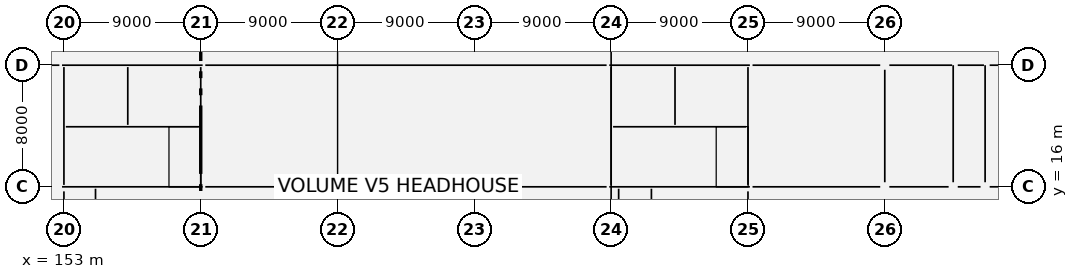
"""IFC4 building model, lengths in metres.
Left out: names, types, materials, properties, quantities, classifications, styles, units other than length and angle.
Written with IfcOpenShell. Run it as: python <this file> out.ifc"""

import sys

from ifc_helpers import new_model, si_unit, direction, frame, frame_2d, origin, origin_2d, place, context, subcontext, project, spatial, rectangle, extrude, element, fill, save


model = new_model("IFC4")
c1 = context("Model", 3, precision=1e-05, world=origin(), true_north=direction((0.0, 1.0)))
c2 = subcontext(c1, "Body", "Model", "MODEL_VIEW")
j1 = project(units=[si_unit("LENGTHUNIT", "METRE"), si_unit("PLANEANGLEUNIT", "RADIAN")], contexts=[c1])
p1 = place(None, origin())
s1 = spatial("IfcSite", under=j1, at=p1, CompositionType="ELEMENT")
p2 = place(p1, origin())
s2 = spatial("IfcBuilding", under=s1, at=p2, CompositionType="ELEMENT")
p3 = place(p2, origin())
s3 = spatial("IfcBuildingStorey", under=s2, at=p3, CompositionType="ELEMENT", Elevation=0.0)
for number, where, z_axis, x_axis in (
    (1, (153.0, 16.0, -0.5), (0.0, 0.0, 1.0), (1.0, 0.0, 0.0)),
    (2, (153.0, 24.0, -0.5), (0.0, 0.0, 1.0), (1.0, 0.0, 0.0)),
    (3, (162.0, 16.0, -0.5), (0.0, 0.0, 1.0), (1.0, 0.0, 0.0)),
    (4, (162.0, 24.0, -0.5), (0.0, 0.0, 1.0), (1.0, 0.0, 0.0)),
    (5, (171.0, 16.0, -0.5), (0.0, 0.0, 1.0), (1.0, 0.0, 0.0)),
    (6, (171.0, 24.0, -0.5), (0.0, 0.0, 1.0), (1.0, 0.0, 0.0)),
    (7, (180.0, 16.0, -0.5), (0.0, 0.0, 1.0), (1.0, 0.0, 0.0)),
    (8, (180.0, 24.0, -0.5), (0.0, 0.0, 1.0), (1.0, 0.0, 0.0)),
    (9, (189.0, 16.0, -0.5), (0.0, 0.0, 1.0), (1.0, 0.0, 0.0)),
    (10, (189.0, 24.0, -0.5), (0.0, 0.0, 1.0), (1.0, 0.0, 0.0)),
    (11, (198.0, 16.0, -0.5), (0.0, 0.0, 1.0), (1.0, 0.0, 0.0)),
    (12, (198.0, 24.0, -0.5), (0.0, 0.0, 1.0), (1.0, 0.0, 0.0)),
    (13, (207.0, 16.0, -0.5), (0.0, 0.0, 1.0), (1.0, 0.0, 0.0)),
    (14, (207.0, 24.0, -0.5), (0.0, 0.0, 1.0), (1.0, 0.0, 0.0)),
):
    element("IfcColumn", number, at=place(p3, frame(where, z_axis=z_axis, x_axis=x_axis)), inside=s3, PredefinedType="COLUMN", context=c2, shape_type="SweptSolid", body=[
        extrude(rectangle(XDim=0.7, YDim=0.7, at=origin_2d()), origin(), (0.0, 0.0, 1.0), 6.8),
    ])
p4 = place(p3, frame((162.125, 16.0, -0.5), z_axis=(0.0, 0.0, 1.0), x_axis=(-1.0, 0.0, 0.0)))
e15 = element("IfcWall", 15, at=p4, inside=s3, PredefinedType="SOLIDWALL", context=c2, shape_type="SweptSolid", body=[
    extrude(rectangle(XDim=9.25, YDim=0.25, at=frame_2d((4.625, 0.0))), origin(), (0.0, 0.0, 1.0), 6.8),
])
p5 = place(p4, frame((7.425, 0.0, 0.5)))
e16 = element("IfcOpeningElement", 16, at=p5, cuts=e15, PredefinedType="OPENING", context=c2, shape_type="SweptSolid", body=[
    extrude(rectangle(XDim=1.2, YDim=2.2, at=frame_2d((0.6, 1.1))), frame((0.0, 0.135, 0.0), z_axis=(0.0, -1.0, 0.0), x_axis=(1.0, 0.0, 0.0)), (0.0, 0.0, 1.0), 0.27),
])
p6 = place(p3, frame((152.875, 24.0, -0.5), z_axis=(0.0, 0.0, 1.0), x_axis=(1.0, 0.0, 0.0)))
e17 = element("IfcWall", 17, at=p6, inside=s3, PredefinedType="SOLIDWALL", context=c2, shape_type="SweptSolid", body=[
    extrude(rectangle(XDim=9.25, YDim=0.25, at=frame_2d((4.625, 0.0))), origin(), (0.0, 0.0, 1.0), 6.8),
])
p7 = place(p6, frame((5.775, 0.0, 0.5)))
e18 = element("IfcOpeningElement", 18, at=p7, cuts=e17, PredefinedType="OPENING", context=c2, shape_type="SweptSolid", body=[
    extrude(rectangle(XDim=1.6, YDim=2.2, at=frame_2d((0.8, 1.1))), frame((0.0, 0.135, 0.0), z_axis=(0.0, -1.0, 0.0), x_axis=(1.0, 0.0, 0.0)), (0.0, 0.0, 1.0), 0.27),
])
p8 = place(p3, frame((153.0, 16.125, -0.5), z_axis=(0.0, 0.0, 1.0), x_axis=(0.0, 1.0, 0.0)))
e19 = element("IfcWall", 19, at=p8, inside=s3, PredefinedType="SOLIDWALL", context=c2, shape_type="SweptSolid", body=[
    extrude(rectangle(XDim=7.75, YDim=0.25, at=frame_2d((3.875, 0.0))), origin(), (0.0, 0.0, 1.0), 6.8),
])
p9 = place(p8, frame((1.15, 0.0, 0.5)))
e20 = element("IfcOpeningElement", 20, at=p9, cuts=e19, PredefinedType="OPENING", context=c2, shape_type="SweptSolid", body=[
    extrude(rectangle(XDim=1.2, YDim=2.2, at=frame_2d((0.6, 1.1))), frame((0.0, 0.135, 0.0), z_axis=(0.0, -1.0, 0.0), x_axis=(1.0, 0.0, 0.0)), (0.0, 0.0, 1.0), 0.27),
])
p10 = place(p3, frame((162.0, 16.125, -0.5), z_axis=(0.0, 0.0, 1.0), x_axis=(0.0, 1.0, 0.0)))
e21 = element("IfcWall", 21, at=p10, inside=s3, PredefinedType="SOLIDWALL", context=c2, shape_type="SweptSolid", body=[
    extrude(rectangle(XDim=7.75, YDim=0.25, at=frame_2d((3.875, 0.0))), origin(), (0.0, 0.0, 1.0), 6.8),
])
p11 = place(p3, frame((153.125, 19.95, -0.5), z_axis=(0.0, 0.0, 1.0), x_axis=(1.0, 0.0, 0.0)))
e22 = element("IfcWall", 22, at=p11, inside=s3, PredefinedType="SOLIDWALL", context=c2, shape_type="SweptSolid", body=[
    extrude(rectangle(XDim=8.75, YDim=0.25, at=frame_2d((4.375, 0.0))), origin(), (0.0, 0.0, 1.0), 6.8),
])
p12 = place(p3, frame((157.2, 20.075, -0.5), z_axis=(0.0, 0.0, 1.0), x_axis=(0.0, 1.0, 0.0)))
e23 = element("IfcWall", 23, at=p12, inside=s3, PredefinedType="SOLIDWALL", context=c2, shape_type="SweptSolid", body=[
    extrude(rectangle(XDim=3.8, YDim=0.25, at=frame_2d((1.9, 0.0))), origin(), (0.0, 0.0, 1.0), 6.8),
])
p13 = place(p12, frame((1.35, 0.0, 0.5)))
e24 = element("IfcOpeningElement", 24, at=p13, cuts=e23, PredefinedType="OPENING", context=c2, shape_type="SweptSolid", body=[
    extrude(rectangle(XDim=1.1, YDim=2.2, at=frame_2d((0.55, 1.1))), frame((0.0, 0.135, 0.0), z_axis=(0.0, -1.0, 0.0), x_axis=(1.0, 0.0, 0.0)), (0.0, 0.0, 1.0), 0.27),
])
p14 = place(p3, frame((198.125, 16.0, -0.5), z_axis=(0.0, 0.0, 1.0), x_axis=(-1.0, 0.0, 0.0)))
e25 = element("IfcWall", 25, at=p14, inside=s3, PredefinedType="SOLIDWALL", context=c2, shape_type="SweptSolid", body=[
    extrude(rectangle(XDim=9.25, YDim=0.25, at=frame_2d((4.625, 0.0))), origin(), (0.0, 0.0, 1.0), 6.8),
])
p15 = place(p14, frame((7.225, 0.0, 0.5)))
e26 = element("IfcOpeningElement", 26, at=p15, cuts=e25, PredefinedType="OPENING", context=c2, shape_type="SweptSolid", body=[
    extrude(rectangle(XDim=1.2, YDim=2.2, at=frame_2d((0.6, 1.1))), frame((0.0, 0.135, 0.0), z_axis=(0.0, -1.0, 0.0), x_axis=(1.0, 0.0, 0.0)), (0.0, 0.0, 1.0), 0.27),
])
p16 = place(p3, frame((188.875, 24.0, -0.5), z_axis=(0.0, 0.0, 1.0), x_axis=(1.0, 0.0, 0.0)))
e27 = element("IfcWall", 27, at=p16, inside=s3, PredefinedType="SOLIDWALL", context=c2, shape_type="SweptSolid", body=[
    extrude(rectangle(XDim=9.25, YDim=0.25, at=frame_2d((4.625, 0.0))), origin(), (0.0, 0.0, 1.0), 6.8),
])
p17 = place(p16, frame((5.775, 0.0, 0.5)))
e28 = element("IfcOpeningElement", 28, at=p17, cuts=e27, PredefinedType="OPENING", context=c2, shape_type="SweptSolid", body=[
    extrude(rectangle(XDim=1.6, YDim=2.2, at=frame_2d((0.8, 1.1))), frame((0.0, 0.135, 0.0), z_axis=(0.0, -1.0, 0.0), x_axis=(1.0, 0.0, 0.0)), (0.0, 0.0, 1.0), 0.27),
])
p18 = place(p3, frame((189.0, 16.125, -0.5), z_axis=(0.0, 0.0, 1.0), x_axis=(0.0, 1.0, 0.0)))
e29 = element("IfcWall", 29, at=p18, inside=s3, PredefinedType="SOLIDWALL", context=c2, shape_type="SweptSolid", body=[
    extrude(rectangle(XDim=7.75, YDim=0.25, at=frame_2d((3.875, 0.0))), origin(), (0.0, 0.0, 1.0), 6.8),
])
p19 = place(p18, frame((1.15, 0.0, 0.5)))
e30 = element("IfcOpeningElement", 30, at=p19, cuts=e29, PredefinedType="OPENING", context=c2, shape_type="SweptSolid", body=[
    extrude(rectangle(XDim=1.2, YDim=2.2, at=frame_2d((0.6, 1.1))), frame((0.0, 0.135, 0.0), z_axis=(0.0, -1.0, 0.0), x_axis=(1.0, 0.0, 0.0)), (0.0, 0.0, 1.0), 0.27),
])
p20 = place(p3, frame((198.0, 16.125, -0.5), z_axis=(0.0, 0.0, 1.0), x_axis=(0.0, 1.0, 0.0)))
e31 = element("IfcWall", 31, at=p20, inside=s3, PredefinedType="SOLIDWALL", context=c2, shape_type="SweptSolid", body=[
    extrude(rectangle(XDim=7.75, YDim=0.25, at=frame_2d((3.875, 0.0))), origin(), (0.0, 0.0, 1.0), 6.8),
])
p21 = place(p3, frame((189.125, 19.95, -0.5), z_axis=(0.0, 0.0, 1.0), x_axis=(1.0, 0.0, 0.0)))
e32 = element("IfcWall", 32, at=p21, inside=s3, PredefinedType="SOLIDWALL", context=c2, shape_type="SweptSolid", body=[
    extrude(rectangle(XDim=8.75, YDim=0.25, at=frame_2d((4.375, 0.0))), origin(), (0.0, 0.0, 1.0), 6.8),
])
p22 = place(p3, frame((193.2, 20.075, -0.5), z_axis=(0.0, 0.0, 1.0), x_axis=(0.0, 1.0, 0.0)))
e33 = element("IfcWall", 33, at=p22, inside=s3, PredefinedType="SOLIDWALL", context=c2, shape_type="SweptSolid", body=[
    extrude(rectangle(XDim=3.8, YDim=0.25, at=frame_2d((1.9, 0.0))), origin(), (0.0, 0.0, 1.0), 6.8),
])
p23 = place(p22, frame((1.35, 0.0, 0.5)))
e34 = element("IfcOpeningElement", 34, at=p23, cuts=e33, PredefinedType="OPENING", context=c2, shape_type="SweptSolid", body=[
    extrude(rectangle(XDim=1.1, YDim=2.2, at=frame_2d((0.55, 1.1))), frame((0.0, 0.135, 0.0), z_axis=(0.0, -1.0, 0.0), x_axis=(1.0, 0.0, 0.0)), (0.0, 0.0, 1.0), 0.27),
])
p24 = place(p3, frame((198.0, 0.45, 0.0), z_axis=(0.0, 0.0, 1.0), x_axis=(0.0, 1.0, 0.0)))
e35 = element("IfcWall", 35, at=p24, inside=s3, PredefinedType="PARTITIONING", context=c2, shape_type="SweptSolid", body=[
    extrude(rectangle(XDim=15.25, YDim=0.11, at=frame_2d((7.625, 0.0))), origin(), (0.0, 0.0, 1.0), 5.35),
])
p25 = place(p24, frame((10.89, 0.0, 0.0)))
e36 = element("IfcOpeningElement", 36, at=p25, cuts=e35, PredefinedType="OPENING", context=c2, shape_type="SweptSolid", body=[
    extrude(rectangle(XDim=1.02, YDim=2.18, at=frame_2d((0.51, 1.09))), frame((0.0, 0.065, 0.0), z_axis=(0.0, -1.0, 0.0), x_axis=(1.0, 0.0, 0.0)), (0.0, 0.0, 1.0), 0.13),
])
p26 = place(p3, frame((153.0, 8.3, 0.0), z_axis=(0.0, 0.0, 1.0), x_axis=(0.0, 1.0, 0.0)))
e37 = element("IfcWall", 37, at=p26, inside=s3, PredefinedType="PARTITIONING", context=c2, shape_type="SweptSolid", body=[
    extrude(rectangle(XDim=7.4, YDim=0.1, at=frame_2d((3.7, 0.0))), origin(), (0.0, 0.0, 1.0), 5.35),
])
p27 = place(p26, frame((2.83, 0.0, 0.0)))
e38 = element("IfcOpeningElement", 38, at=p27, cuts=e37, PredefinedType="OPENING", context=c2, shape_type="SweptSolid", body=[
    extrude(rectangle(XDim=1.74, YDim=2.28, at=frame_2d((0.87, 1.14))), frame((0.0, 0.06, 0.0), z_axis=(0.0, -1.0, 0.0), x_axis=(1.0, 0.0, 0.0)), (0.0, 0.0, 1.0), 0.12),
])
p28 = place(p3, frame((162.3, 16.0, 0.0), z_axis=(0.0, 0.0, 1.0), x_axis=(1.0, 0.0, 0.0)))
e39 = element("IfcWall", 39, at=p28, inside=s3, PredefinedType="PARTITIONING", context=c2, shape_type="SweptSolid", body=[
    extrude(rectangle(XDim=26.4, YDim=0.14, at=frame_2d((13.2, 0.0))), origin(), (0.0, 0.0, 1.0), 5.25),
])
p29 = place(p28, frame((12.71, 0.0, 0.0)))
e40 = element("IfcOpeningElement", 40, at=p29, cuts=e39, PredefinedType="OPENING", context=c2, shape_type="SweptSolid", body=[
    extrude(rectangle(XDim=0.98, YDim=2.12, at=frame_2d((0.49, 1.06))), frame((0.0, 0.08, 0.0), z_axis=(0.0, -1.0, 0.0), x_axis=(1.0, 0.0, 0.0)), (0.0, 0.0, 1.0), 0.16),
])
p30 = place(p3, frame((198.3, 16.0, 0.0), z_axis=(0.0, 0.0, 1.0), x_axis=(1.0, 0.0, 0.0)))
e41 = element("IfcWall", 41, at=p30, inside=s3, PredefinedType="PARTITIONING", context=c2, shape_type="SweptSolid", body=[
    extrude(rectangle(XDim=8.4, YDim=0.135, at=frame_2d((4.2, 0.0))), origin(), (0.0, 0.0, 1.0), 5.25),
])
p31 = place(p3, frame((207.3, 16.0, 0.0), z_axis=(0.0, 0.0, 1.0), x_axis=(1.0, 0.0, 0.0)))
e42 = element("IfcWall", 42, at=p31, inside=s3, PredefinedType="PARTITIONING", context=c2, shape_type="SweptSolid", body=[
    extrude(rectangle(XDim=3.9, YDim=0.15, at=frame_2d((1.95, 0.0))), origin(), (0.0, 0.0, 1.0), 5.25),
])
p32 = place(p3, frame((211.8, 16.0, 0.0), z_axis=(0.0, 0.0, 1.0), x_axis=(1.0, 0.0, 0.0)))
e43 = element("IfcWall", 43, at=p32, inside=s3, PredefinedType="PARTITIONING", context=c2, shape_type="SweptSolid", body=[
    extrude(rectangle(XDim=1.5, YDim=0.135, at=frame_2d((0.75, 0.0))), origin(), (0.0, 0.0, 1.0), 5.25),
])
p33 = place(p3, frame((213.9, 16.0, 0.0), z_axis=(0.0, 0.0, 1.0), x_axis=(1.0, 0.0, 0.0)))
e44 = element("IfcWall", 44, at=p33, inside=s3, PredefinedType="PARTITIONING", context=c2, shape_type="SweptSolid", body=[
    extrude(rectangle(XDim=1.65, YDim=0.14, at=frame_2d((0.825, 0.0))), origin(), (0.0, 0.0, 1.0), 5.25),
])
p34 = place(p3, frame((150.15, 24.0, 0.0), z_axis=(0.0, 0.0, 1.0), x_axis=(1.0, 0.0, 0.0)))
e45 = element("IfcWall", 45, at=p34, inside=s3, PredefinedType="PARTITIONING", context=c2, shape_type="SweptSolid", body=[
    extrude(rectangle(XDim=2.55, YDim=0.11, at=frame_2d((1.275, 0.0))), origin(), (0.0, 0.0, 1.0), 5.1),
])
p35 = place(p34, frame((0.805, 0.0, 0.0)))
e46 = element("IfcOpeningElement", 46, at=p35, cuts=e45, PredefinedType="OPENING", context=c2, shape_type="SweptSolid", body=[
    extrude(rectangle(XDim=0.94, YDim=2.14, at=frame_2d((0.47, 1.07))), frame((0.0, 0.065, 0.0), z_axis=(0.0, -1.0, 0.0), x_axis=(1.0, 0.0, 0.0)), (0.0, 0.0, 1.0), 0.13),
])
p36 = place(p3, frame((162.3, 24.0, 0.0), z_axis=(0.0, 0.0, 1.0), x_axis=(1.0, 0.0, 0.0)))
e47 = element("IfcWall", 47, at=p36, inside=s3, PredefinedType="PARTITIONING", context=c2, shape_type="SweptSolid", body=[
    extrude(rectangle(XDim=26.4, YDim=0.14, at=frame_2d((13.2, 0.0))), origin(), (0.0, 0.0, 1.0), 5.1),
])
p37 = place(p36, frame((12.7, 0.0, 0.0)))
e48 = element("IfcOpeningElement", 48, at=p37, cuts=e47, PredefinedType="OPENING", context=c2, shape_type="SweptSolid", body=[
    extrude(rectangle(XDim=1.0, YDim=2.15, at=frame_2d((0.5, 1.075))), frame((0.0, 0.08, 0.0), z_axis=(0.0, -1.0, 0.0), x_axis=(1.0, 0.0, 0.0)), (0.0, 0.0, 1.0), 0.16),
])
p38 = place(p3, frame((198.3, 24.0, 0.0), z_axis=(0.0, 0.0, 1.0), x_axis=(1.0, 0.0, 0.0)))
e49 = element("IfcWall", 49, at=p38, inside=s3, PredefinedType="PARTITIONING", context=c2, shape_type="SweptSolid", body=[
    extrude(rectangle(XDim=8.4, YDim=0.135, at=frame_2d((4.2, 0.0))), origin(), (0.0, 0.0, 1.0), 5.1),
])
p39 = place(p38, frame((3.74, 0.0, 0.0)))
e50 = element("IfcOpeningElement", 50, at=p39, cuts=e49, PredefinedType="OPENING", context=c2, shape_type="SweptSolid", body=[
    extrude(rectangle(XDim=0.92, YDim=2.1, at=frame_2d((0.46, 1.05))), frame((0.0, 0.077, 0.0), z_axis=(0.0, -1.0, 0.0), x_axis=(1.0, 0.0, 0.0)), (0.0, 0.0, 1.0), 0.155),
])
p40 = place(p3, frame((207.3, 24.0, 0.0), z_axis=(0.0, 0.0, 1.0), x_axis=(1.0, 0.0, 0.0)))
e51 = element("IfcWall", 51, at=p40, inside=s3, PredefinedType="PARTITIONING", context=c2, shape_type="SweptSolid", body=[
    extrude(rectangle(XDim=4.133, YDim=0.15, at=frame_2d((2.066, 0.0))), origin(), (0.0, 0.0, 1.0), 5.1),
])
p41 = place(p40, frame((1.49, 0.0, 0.0)))
e52 = element("IfcOpeningElement", 52, at=p41, cuts=e51, PredefinedType="OPENING", context=c2, shape_type="SweptSolid", body=[
    extrude(rectangle(XDim=0.92, YDim=2.1, at=frame_2d((0.46, 1.05))), frame((0.0, 0.085, 0.0), z_axis=(0.0, -1.0, 0.0), x_axis=(1.0, 0.0, 0.0)), (0.0, 0.0, 1.0), 0.17),
])
p42 = place(p3, frame((211.8, 24.0, 0.0), z_axis=(0.0, 0.0, 1.0), x_axis=(1.0, 0.0, 0.0)))
e53 = element("IfcWall", 53, at=p42, inside=s3, PredefinedType="PARTITIONING", context=c2, shape_type="SweptSolid", body=[
    extrude(rectangle(XDim=1.725, YDim=0.135, at=frame_2d((0.862, 0.0))), origin(), (0.0, 0.0, 1.0), 5.1),
])
p43 = place(p42, frame((0.225, 0.0, 0.0)))
e54 = element("IfcOpeningElement", 54, at=p43, cuts=e53, PredefinedType="OPENING", context=c2, shape_type="SweptSolid", body=[
    extrude(rectangle(XDim=1.05, YDim=2.15, at=frame_2d((0.525, 1.075))), frame((0.0, 0.077, 0.0), z_axis=(0.0, -1.0, 0.0), x_axis=(1.0, 0.0, 0.0)), (0.0, 0.0, 1.0), 0.155),
])
p44 = place(p3, frame((213.9, 24.0, 0.0), z_axis=(0.0, 0.0, 1.0), x_axis=(1.0, 0.0, 0.0)))
e55 = element("IfcWall", 55, at=p44, inside=s3, PredefinedType="PARTITIONING", context=c2, shape_type="SweptSolid", body=[
    extrude(rectangle(XDim=1.65, YDim=0.14, at=frame_2d((0.825, 0.0))), origin(), (0.0, 0.0, 1.0), 5.1),
])
p45 = place(p44, frame((0.315, 0.0, 0.0)))
e56 = element("IfcOpeningElement", 56, at=p45, cuts=e55, PredefinedType="OPENING", context=c2, shape_type="SweptSolid", body=[
    extrude(rectangle(XDim=1.02, YDim=2.18, at=frame_2d((0.51, 1.09))), frame((0.0, 0.08, 0.0), z_axis=(0.0, -1.0, 0.0), x_axis=(1.0, 0.0, 0.0)), (0.0, 0.0, 1.0), 0.16),
])
p46 = place(p3, frame((207.0, 16.3, 0.0), z_axis=(0.0, 0.0, 1.0), x_axis=(0.0, 1.0, 0.0)))
e57 = element("IfcWall", 57, at=p46, inside=s3, PredefinedType="PARTITIONING", context=c2, shape_type="SweptSolid", body=[
    extrude(rectangle(XDim=7.4, YDim=0.15, at=frame_2d((3.7, 0.0))), origin(), (0.0, 0.0, 1.0), 5.35),
])
p47 = place(p3, frame((211.5, 16.3, 0.0), z_axis=(0.0, 0.0, 1.0), x_axis=(0.0, 1.0, 0.0)))
e58 = element("IfcWall", 58, at=p47, inside=s3, PredefinedType="PARTITIONING", context=c2, shape_type="SweptSolid", body=[
    extrude(rectangle(XDim=7.7, YDim=0.135, at=frame_2d((3.85, 0.0))), origin(), (0.0, 0.0, 1.0), 5.95),
])
p48 = place(p3, frame((213.6, 16.3, 0.0), z_axis=(0.0, 0.0, 1.0), x_axis=(0.0, 1.0, 0.0)))
e59 = element("IfcWall", 59, at=p48, inside=s3, PredefinedType="PARTITIONING", context=c2, shape_type="SweptSolid", body=[
    extrude(rectangle(XDim=7.7, YDim=0.15, at=frame_2d((3.85, 0.0))), origin(), (0.0, 0.0, 1.0), 5.95),
])
for number, where, z_axis, x_axis in (
    (60, (155.077, 0.17, 0.0), (0.0, 0.0, 1.0), (0.0, 1.0, 0.0)),
    (61, (189.492, 0.17, 0.0), (0.0, 0.0, 1.0), (0.0, 1.0, 0.0)),
    (62, (191.647, 0.17, 0.0), (0.0, 0.0, 1.0), (0.0, 1.0, 0.0)),
):
    element("IfcWall", number, at=place(p3, frame(where, z_axis=z_axis, x_axis=x_axis)), inside=s3, PredefinedType="STANDARD", context=c2, shape_type="SweptSolid", body=[
        extrude(rectangle(XDim=15.705, YDim=0.255, at=frame_2d((7.853, 0.0))), origin(), (0.0, 0.0, 1.0), 5.95),
    ])
p49 = place(p13, origin())
e63 = element("IfcDoor", 63, at=p49, inside=s3, OperationType="SLIDING_TO_LEFT", PredefinedType="DOOR", context=c2, shape_type="SweptSolid", body=[
    extrude(rectangle(XDim=1.1, YDim=2.2, at=frame_2d((0.55, 1.1))), frame((0.0, 0.025, 0.0), z_axis=(0.0, -1.0, 0.0), x_axis=(1.0, 0.0, 0.0)), (0.0, 0.0, 1.0), 0.05),
])
fill(e24, e63)
p50 = place(p9, origin())
e64 = element("IfcDoor", 64, at=p50, inside=s3, OperationType="SINGLE_SWING_LEFT", PredefinedType="DOOR", context=c2, shape_type="SweptSolid", body=[
    extrude(rectangle(XDim=1.2, YDim=2.2, at=frame_2d((0.6, 1.1))), frame((0.0, 0.025, 0.0), z_axis=(0.0, -1.0, 0.0), x_axis=(1.0, 0.0, 0.0)), (0.0, 0.0, 1.0), 0.05),
])
fill(e20, e64)
p51 = place(p7, origin())
e65 = element("IfcDoor", 65, at=p51, inside=s3, OperationType="SINGLE_SWING_RIGHT", PredefinedType="DOOR", context=c2, shape_type="SweptSolid", body=[
    extrude(rectangle(XDim=1.6, YDim=2.2, at=frame_2d((0.8, 1.1))), frame((0.0, 0.025, 0.0), z_axis=(0.0, -1.0, 0.0), x_axis=(1.0, 0.0, 0.0)), (0.0, 0.0, 1.0), 0.05),
])
fill(e18, e65)
p52 = place(p23, origin())
e66 = element("IfcDoor", 66, at=p52, inside=s3, OperationType="SLIDING_TO_LEFT", PredefinedType="DOOR", context=c2, shape_type="SweptSolid", body=[
    extrude(rectangle(XDim=1.1, YDim=2.2, at=frame_2d((0.55, 1.1))), frame((0.0, 0.025, 0.0), z_axis=(0.0, -1.0, 0.0), x_axis=(1.0, 0.0, 0.0)), (0.0, 0.0, 1.0), 0.05),
])
fill(e34, e66)
p53 = place(p19, origin())
e67 = element("IfcDoor", 67, at=p53, inside=s3, OperationType="SINGLE_SWING_LEFT", PredefinedType="DOOR", context=c2, shape_type="SweptSolid", body=[
    extrude(rectangle(XDim=1.2, YDim=2.2, at=frame_2d((0.6, 1.1))), frame((0.0, 0.025, 0.0), z_axis=(0.0, -1.0, 0.0), x_axis=(1.0, 0.0, 0.0)), (0.0, 0.0, 1.0), 0.05),
])
fill(e30, e67)
p54 = place(p17, origin())
e68 = element("IfcDoor", 68, at=p54, inside=s3, OperationType="SINGLE_SWING_RIGHT", PredefinedType="DOOR", context=c2, shape_type="SweptSolid", body=[
    extrude(rectangle(XDim=1.6, YDim=2.2, at=frame_2d((0.8, 1.1))), frame((0.0, 0.025, 0.0), z_axis=(0.0, -1.0, 0.0), x_axis=(1.0, 0.0, 0.0)), (0.0, 0.0, 1.0), 0.05),
])
fill(e28, e68)
p55 = place(p29, origin())
e69 = element("IfcDoor", 69, at=p55, inside=s3, OperationType="SINGLE_SWING_RIGHT", PredefinedType="DOOR", context=c2, shape_type="SweptSolid", body=[
    extrude(rectangle(XDim=0.98, YDim=2.12, at=frame_2d((0.49, 1.06))), frame((0.0, 0.025, 0.0), z_axis=(0.0, -1.0, 0.0), x_axis=(1.0, 0.0, 0.0)), (0.0, 0.0, 1.0), 0.05),
])
fill(e40, e69)
p56 = place(p37, origin())
e70 = element("IfcDoor", 70, at=p56, inside=s3, OperationType="SINGLE_SWING_LEFT", PredefinedType="DOOR", context=c2, shape_type="SweptSolid", body=[
    extrude(rectangle(XDim=1.0, YDim=2.15, at=frame_2d((0.5, 1.075))), frame((0.0, 0.025, 0.0), z_axis=(0.0, -1.0, 0.0), x_axis=(1.0, 0.0, 0.0)), (0.0, 0.0, 1.0), 0.05),
])
fill(e48, e70)
p57 = place(p39, origin())
e71 = element("IfcDoor", 71, at=p57, inside=s3, OperationType="SINGLE_SWING_RIGHT", PredefinedType="DOOR", context=c2, shape_type="SweptSolid", body=[
    extrude(rectangle(XDim=0.92, YDim=2.1, at=frame_2d((0.46, 1.05))), frame((0.0, 0.025, 0.0), z_axis=(0.0, -1.0, 0.0), x_axis=(1.0, 0.0, 0.0)), (0.0, 0.0, 1.0), 0.05),
])
fill(e50, e71)
p58 = place(p41, origin())
e72 = element("IfcDoor", 72, at=p58, inside=s3, OperationType="SINGLE_SWING_LEFT", PredefinedType="DOOR", context=c2, shape_type="SweptSolid", body=[
    extrude(rectangle(XDim=0.92, YDim=2.1, at=frame_2d((0.46, 1.05))), frame((0.0, 0.025, 0.0), z_axis=(0.0, -1.0, 0.0), x_axis=(1.0, 0.0, 0.0)), (0.0, 0.0, 1.0), 0.05),
])
fill(e52, e72)
p59 = place(p43, origin())
e73 = element("IfcDoor", 73, at=p59, inside=s3, OperationType="SINGLE_SWING_RIGHT", PredefinedType="DOOR", context=c2, shape_type="SweptSolid", body=[
    extrude(rectangle(XDim=1.05, YDim=2.15, at=frame_2d((0.525, 1.075))), frame((0.0, 0.025, 0.0), z_axis=(0.0, -1.0, 0.0), x_axis=(1.0, 0.0, 0.0)), (0.0, 0.0, 1.0), 0.05),
])
fill(e54, e73)
p60 = place(p45, origin())
e74 = element("IfcDoor", 74, at=p60, inside=s3, OperationType="SINGLE_SWING_LEFT", PredefinedType="DOOR", context=c2, shape_type="SweptSolid", body=[
    extrude(rectangle(XDim=1.02, YDim=2.18, at=frame_2d((0.51, 1.09))), frame((0.0, 0.025, 0.0), z_axis=(0.0, -1.0, 0.0), x_axis=(1.0, 0.0, 0.0)), (0.0, 0.0, 1.0), 0.05),
])
fill(e56, e74)
p61 = place(p5, origin())
e75 = element("IfcDoor", 75, at=p61, inside=s3, OperationType="SINGLE_SWING_RIGHT", PredefinedType="DOOR", context=c2, shape_type="SweptSolid", body=[
    extrude(rectangle(XDim=1.2, YDim=2.2, at=frame_2d((0.6, 1.1))), frame((0.0, 0.025, 0.0), z_axis=(0.0, -1.0, 0.0), x_axis=(1.0, 0.0, 0.0)), (0.0, 0.0, 1.0), 0.05),
])
fill(e16, e75)
p62 = place(p15, origin())
e76 = element("IfcDoor", 76, at=p62, inside=s3, OperationType="SINGLE_SWING_LEFT", PredefinedType="DOOR", context=c2, shape_type="SweptSolid", body=[
    extrude(rectangle(XDim=1.2, YDim=2.2, at=frame_2d((0.6, 1.1))), frame((0.0, 0.025, 0.0), z_axis=(0.0, -1.0, 0.0), x_axis=(1.0, 0.0, 0.0)), (0.0, 0.0, 1.0), 0.05),
])
fill(e26, e76)
save(model, sys.argv[1])
